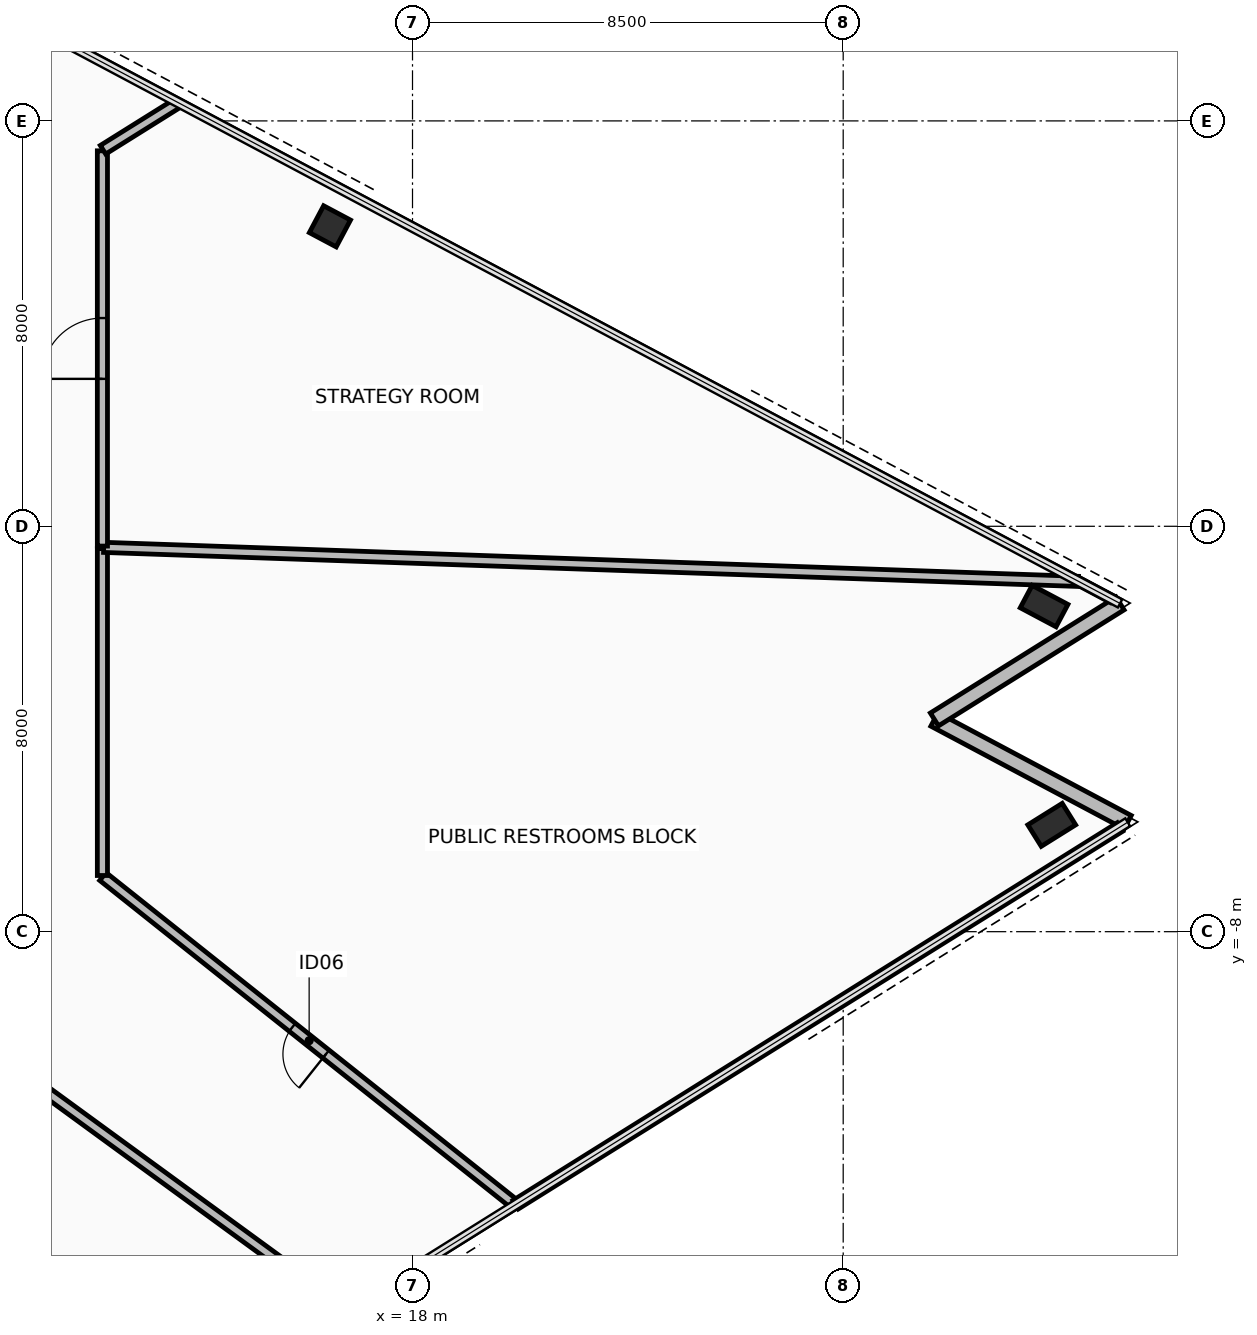
"""IFC4 building model, lengths in metres.
Left out: names, types, materials, properties, quantities, classifications, styles, units other than length and angle.
Written with IfcOpenShell. Run it as: python <this file> out.ifc"""

import sys

from ifc_helpers import new_model, si_unit, direction, frame, frame_2d, origin, origin_2d, place, context, subcontext, project, spatial, rectangle, hollow_rectangle, extrude, element, fill, save


model = new_model("IFC4")
c1 = context("Model", 3, precision=1e-05, world=origin(), true_north=direction((0.0, 1.0)))
c2 = subcontext(c1, "Body", "Model", "MODEL_VIEW")
j1 = project(units=[si_unit("LENGTHUNIT", "METRE"), si_unit("PLANEANGLEUNIT", "RADIAN")], contexts=[c1])
p1 = place(None, origin())
s1 = spatial("IfcSite", under=j1, at=p1, CompositionType="ELEMENT")
p2 = place(p1, origin())
s2 = spatial("IfcBuilding", under=s1, at=p2, CompositionType="ELEMENT")
p3 = place(p2, frame((0.0, 0.0, 146.0)))
s3 = spatial("IfcBuildingStorey", under=s2, at=p3, CompositionType="ELEMENT", Elevation=146.0)
for number, where, z_axis, x_axis in (
    (1, (30.615, -5.892, 0.0), (0.0, 0.0, 1.0), (0.848, 0.53, 0.0)),
    (2, (30.465, -1.575, 0.0), (0.0, 0.0, 1.0), (-0.883, 0.469, 0.0)),
):
    element("IfcColumn", number, at=place(p3, frame(where, z_axis=z_axis, x_axis=x_axis)), inside=s3, PredefinedType="COLUMN", context=c2, shape_type="SweptSolid", body=[
        extrude(hollow_rectangle(XDim=0.5, YDim=0.8, WallThickness=0.04, at=origin_2d()), origin(), (0.0, 0.0, 1.0), 3.6),
    ])
p4 = place(p3, frame((16.37, 5.919, 0.0), z_axis=(0.0, 0.0, 1.0), x_axis=(-0.88294841224, 0.469470021751, 0.0)))
e3 = element("IfcColumn", 3, at=p4, inside=s3, PredefinedType="COLUMN", context=c2, shape_type="SweptSolid", body=[
    extrude(hollow_rectangle(XDim=0.6, YDim=0.6, WallThickness=0.036, at=origin_2d()), origin(), (0.0, 0.0, 1.0), 3.6),
])
p5 = place(p3, frame((32.115, -5.84, 0.0), z_axis=(0.0, 0.0, 1.0), x_axis=(-0.882945167019, 0.469476125099, 0.0)))
e4 = element("IfcWall", 4, at=p5, inside=s3, PredefinedType="STANDARD", context=c2, shape_type="SweptSolid", body=[
    extrude(rectangle(XDim=4.32, YDim=0.3, at=frame_2d((2.16, 0.0))), origin(), (0.0, 0.0, 1.0), 2.705),
])
p6 = place(p3, frame((28.3, -3.812, 0.0), z_axis=(0.0, 0.0, 1.0), x_axis=(0.848042749904, 0.529927819929, 0.0)))
e5 = element("IfcWall", 5, at=p6, inside=s3, PredefinedType="STANDARD", context=c2, shape_type="SweptSolid", body=[
    extrude(rectangle(XDim=4.32, YDim=0.3, at=frame_2d((2.16, 0.0))), origin(), (0.0, 0.0, 1.0), 2.705),
])
p7 = place(p3, frame((9.985, -10.585, 0.0), z_axis=(0.0, 0.0, 1.0), x_axis=(0.807835985814, -0.589407346429, 0.0)))
e6 = element("IfcWall", 6, at=p7, inside=s3, PredefinedType="PARTITIONING", context=c2, shape_type="SweptSolid", body=[
    extrude(rectangle(XDim=8.301, YDim=0.2, at=frame_2d((4.151, 0.0))), origin(), (0.0, 0.0, 1.0), 2.705),
])
p8 = place(p3, frame((20.03, -13.391, 0.0), z_axis=(0.0, 0.0, 1.0), x_axis=(-0.782379652936, 0.622801797261, 0.0)))
e7 = element("IfcWall", 7, at=p8, inside=s3, PredefinedType="PARTITIONING", context=c2, shape_type="SweptSolid", body=[
    extrude(rectangle(XDim=10.405, YDim=0.2, at=frame_2d((5.203, 0.0))), origin(), (0.0, 0.0, 1.0), 2.705),
])
p9 = place(p8, frame((4.777, 0.0, 0.0)))
e8 = element("IfcOpeningElement", 8, at=p9, cuts=e7, PredefinedType="OPENING", context=c2, shape_type="SweptSolid", body=[
    extrude(rectangle(XDim=0.85, YDim=2.1, at=frame_2d((0.425, 1.05))), frame((0.0, 0.11, 0.0), z_axis=(0.0, -1.0, 0.0), x_axis=(1.0, 0.0, 0.0)), (0.0, 0.0, 1.0), 0.22),
])
p10 = place(p3, frame((11.88, -6.891, 0.0), z_axis=(0.0, 0.0, 1.0), x_axis=(0.0, 1.0, 0.0)))
e9 = element("IfcWall", 9, at=p10, inside=s3, PredefinedType="PARTITIONING", context=c2, shape_type="SweptSolid", body=[
    extrude(rectangle(XDim=6.451, YDim=0.2, at=frame_2d((3.225, 0.0))), origin(), (0.0, 0.0, 1.0), 2.855),
])
p11 = place(p3, frame((11.906, -0.416, 0.0), z_axis=(0.0, 0.0, 1.0), x_axis=(0.999390899128, -0.034897431724, 0.0)))
e10 = element("IfcWall", 10, at=p11, inside=s3, PredefinedType="PARTITIONING", context=c2, shape_type="SweptSolid", body=[
    extrude(rectangle(XDim=19.246, YDim=0.2, at=frame_2d((9.623, 0.0))), origin(), (0.0, 0.0, 1.0), 2.705),
])
p12 = place(p3, frame((31.151, -1.09, 0.0), z_axis=(0.0, 0.0, 1.0), x_axis=(0.883026217121, -0.469323662175, 0.0)))
e11 = element("IfcWall", 11, at=p12, inside=s3, PredefinedType="PARTITIONING", context=c2, shape_type="SweptSolid", body=[
    extrude(rectangle(XDim=0.742, YDim=0.15, at=frame_2d((0.371, 0.0))), origin(), (0.0, 0.0, 1.0), 3.41),
])
p13 = place(p3, frame((31.963, -5.935, 0.0), z_axis=(0.0, 0.0, 1.0), x_axis=(-0.848057783803, -0.529903760442, 0.0)))
e12 = element("IfcWall", 12, at=p13, inside=s3, PredefinedType="PARTITIONING", context=c2, shape_type="SweptSolid", body=[
    extrude(rectangle(XDim=14.065, YDim=0.2, at=frame_2d((7.032, 0.0))), origin(), (0.0, 0.0, 1.0), 3.41),
])
p14 = place(p3, frame((11.88, -0.391, 0.0), z_axis=(0.0, 0.0, 1.0), x_axis=(0.0, 1.0, 0.0)))
e13 = element("IfcWall", 13, at=p14, inside=s3, PredefinedType="PARTITIONING", context=c2, shape_type="SweptSolid", body=[
    extrude(rectangle(XDim=7.8, YDim=0.2, at=frame_2d((3.9, 0.0))), origin(), (0.0, 0.0, 1.0), 2.855),
])
p15 = place(p14, frame((3.3, 0.0, 0.0)))
e14 = element("IfcOpeningElement", 14, at=p15, cuts=e13, PredefinedType="OPENING", context=c2, shape_type="SweptSolid", body=[
    extrude(rectangle(XDim=1.2, YDim=2.15, at=frame_2d((0.6, 1.075))), frame((0.0, 0.11, 0.0), z_axis=(0.0, -1.0, 0.0), x_axis=(1.0, 0.0, 0.0)), (0.0, 0.0, 1.0), 0.22),
])
p16 = place(p3, frame((11.892, 7.431, 0.0), z_axis=(0.0, 0.0, 1.0), x_axis=(0.848045643795, 0.529923188811, 0.0)))
e15 = element("IfcWall", 15, at=p16, inside=s3, PredefinedType="PARTITIONING", context=c2, shape_type="SweptSolid", body=[
    extrude(rectangle(XDim=1.738, YDim=0.2, at=frame_2d((0.869, 0.0))), origin(), (0.0, 0.0, 1.0), 2.705),
])
p17 = place(p9, origin())
e16 = element("IfcDoor", 16, at=p17, inside=s3, OperationType="SINGLE_SWING_RIGHT", PredefinedType="DOOR", context=c2, shape_type="SweptSolid", body=[
    extrude(rectangle(XDim=0.85, YDim=2.1, at=frame_2d((0.425, 1.05))), frame((0.0, 0.025, 0.0), z_axis=(0.0, -1.0, 0.0), x_axis=(1.0, 0.0, 0.0)), (0.0, 0.0, 1.0), 0.05),
])
fill(e8, e16)
p18 = place(p15, origin())
e17 = element("IfcDoor", 17, at=p18, inside=s3, OperationType="SINGLE_SWING_LEFT", PredefinedType="DOOR", context=c2, shape_type="SweptSolid", body=[
    extrude(rectangle(XDim=1.2, YDim=2.15, at=frame_2d((0.6, 1.075))), frame((0.0, 0.025, 0.0), z_axis=(0.0, -1.0, 0.0), x_axis=(1.0, 0.0, 0.0)), (0.0, 0.0, 1.0), 0.05),
])
fill(e14, e17)
save(model, sys.argv[1])
